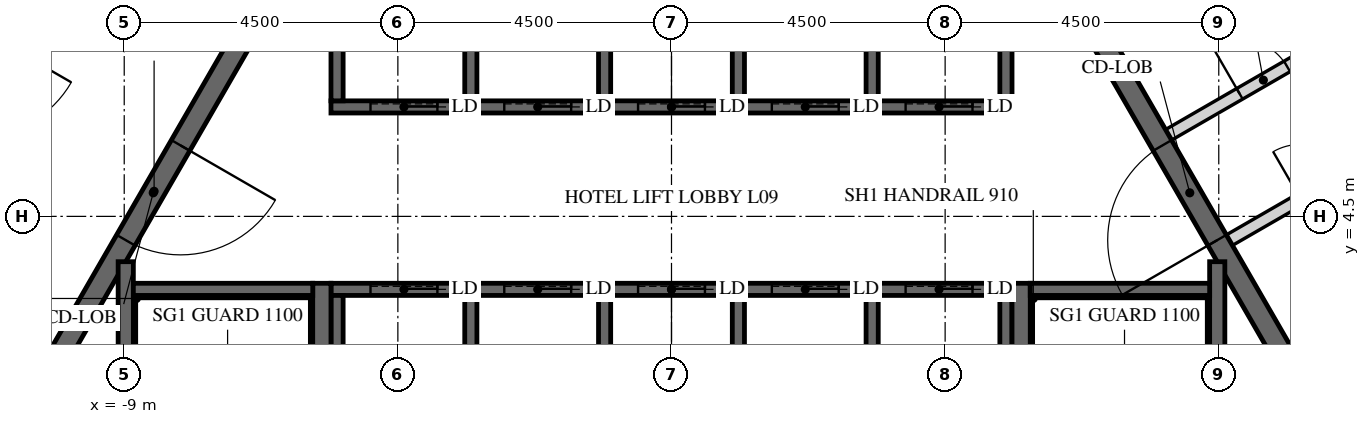
"""IFC4 building model, lengths in metres.
Left out: names, types, materials, properties, quantities, classifications, styles, units other than length and angle.
Written with IfcOpenShell. Run it as: python <this file> out.ifc"""

import sys

from ifc_helpers import new_model, si_unit, direction, frame, frame_2d, origin, place, context, subcontext, project, spatial, polyline, rectangle, outline, extrude, element, fill, save


model = new_model("IFC4")
c1 = context("Model", 3, precision=1e-05, world=origin(), true_north=direction((0.0, 1.0)))
c2 = subcontext(c1, "Body", "Model", "MODEL_VIEW")
j1 = project(units=[si_unit("LENGTHUNIT", "METRE"), si_unit("PLANEANGLEUNIT", "RADIAN")], contexts=[c1])
p1 = place(None, origin())
s1 = spatial("IfcSite", under=j1, at=p1, CompositionType="ELEMENT")
p2 = place(p1, origin())
s2 = spatial("IfcBuilding", under=s1, at=p2, CompositionType="ELEMENT")
p3 = place(p2, frame((0.0, 0.0, 49.2)))
s3 = spatial("IfcBuildingStorey", under=s2, at=p3, CompositionType="ELEMENT", Elevation=49.2)
p4 = place(p3, frame((-7.91, 13.7, -0.15), z_axis=(0.0, 0.0, 1.0), x_axis=(-0.499999880136, -0.866025472988, 0.0)))
e1 = element("IfcWall", 1, at=p4, inside=s3, PredefinedType="SHEAR", context=c2, shape_type="SweptSolid", body=[
    extrude(outline(polyline([(-0.173, -0.3), (15.993, -0.3), (15.646, 0.3), (0.173, 0.3), (-0.173, -0.3)])), origin(), (0.0, 0.0, 1.0), 3.9),
])
p5 = place(p4, frame((7.039, 0.0, 0.15)))
e2 = element("IfcOpeningElement", 2, at=p5, cuts=e1, PredefinedType="OPENING", context=c2, shape_type="SweptSolid", body=[
    extrude(rectangle(XDim=1.8, YDim=2.4, at=frame_2d((0.9, 1.2))), frame((0.0, 0.31, 0.0), z_axis=(0.0, -1.0, 0.0), x_axis=(1.0, 0.0, 0.0)), (0.0, 0.0, 1.0), 0.62),
])
p6 = place(p3, frame((15.819, 0.0, -0.15), z_axis=(0.0, 0.0, 1.0), x_axis=(-0.499999880136, 0.866025472988, 0.0)))
e3 = element("IfcWall", 3, at=p6, inside=s3, PredefinedType="SHEAR", context=c2, shape_type="SweptSolid", body=[
    extrude(outline(polyline([(-0.173, -0.3), (15.993, -0.3), (15.646, 0.3), (0.173, 0.3), (-0.173, -0.3)])), origin(), (0.0, 0.0, 1.0), 3.9),
])
p7 = place(p6, frame((6.981, 0.0, 0.15)))
e4 = element("IfcOpeningElement", 4, at=p7, cuts=e3, PredefinedType="OPENING", context=c2, shape_type="SweptSolid", body=[
    extrude(rectangle(XDim=1.8, YDim=2.4, at=frame_2d((0.9, 1.2))), frame((0.0, 0.31, 0.0), z_axis=(0.0, -1.0, 0.0), x_axis=(1.0, 0.0, 0.0)), (0.0, 0.0, 1.0), 0.62),
])
p8 = place(p3, frame((-5.673, 9.825, -0.15), z_axis=(0.0, 0.0, 1.0), x_axis=(-0.499995046907, -0.866028263435, 0.0)))
e5 = element("IfcWall", 5, at=p8, inside=s3, PredefinedType="SHEAR", context=c2, shape_type="SweptSolid", body=[
    extrude(outline(polyline([(-0.101, -0.175), (11.446, -0.175), (11.244, 0.175), (0.101, 0.175), (-0.101, -0.175)])), origin(), (0.0, 0.0, 1.0), 3.9),
])
p9 = place(p8, frame((4.801, 0.0, 0.15)))
e6 = element("IfcOpeningElement", 6, at=p9, cuts=e5, PredefinedType="OPENING", context=c2, shape_type="SweptSolid", body=[
    extrude(rectangle(XDim=1.8, YDim=2.4, at=frame_2d((0.9, 1.2))), frame((0.0, 0.185, 0.0), z_axis=(0.0, -1.0, 0.0), x_axis=(1.0, 0.0, 0.0)), (0.0, 0.0, 1.0), 0.37),
])
p10 = place(p3, frame((11.345, 0.0, -0.15), z_axis=(0.0, 0.0, 1.0), x_axis=(-0.499995046907, 0.866028263435, 0.0)))
e7 = element("IfcWall", 7, at=p10, inside=s3, PredefinedType="SHEAR", context=c2, shape_type="SweptSolid", body=[
    extrude(outline(polyline([(-0.101, -0.175), (11.446, -0.175), (11.244, 0.175), (0.101, 0.175), (-0.101, -0.175)])), origin(), (0.0, 0.0, 1.0), 3.9),
])
p11 = place(p10, frame((4.744, 0.0, 0.15)))
e8 = element("IfcOpeningElement", 8, at=p11, cuts=e7, PredefinedType="OPENING", context=c2, shape_type="SweptSolid", body=[
    extrude(rectangle(XDim=1.8, YDim=2.4, at=frame_2d((0.9, 1.2))), frame((0.0, 0.185, 0.0), z_axis=(0.0, -1.0, 0.0), x_axis=(1.0, 0.0, 0.0)), (0.0, 0.0, 1.0), 0.37),
])
p12 = place(p3, frame((-5.6, 6.3, -0.25), z_axis=(0.0, 0.0, 1.0), x_axis=(1.0, 0.0, 0.0)))
e9 = element("IfcWall", 9, at=p12, inside=s3, PredefinedType="SHEAR", context=c2, shape_type="SweptSolid", body=[
    extrude(rectangle(XDim=11.2, YDim=0.2, at=frame_2d((5.6, 0.0))), origin(), (0.0, 0.0, 1.0), 3.9),
])
p13 = place(p12, frame((0.65, 0.0, 0.25)))
e10 = element("IfcOpeningElement", 10, at=p13, cuts=e9, PredefinedType="OPENING", context=c2, shape_type="SweptSolid", body=[
    extrude(rectangle(XDim=1.1, YDim=2.1, at=frame_2d((0.55, 1.05))), frame((0.0, 0.11, 0.0), z_axis=(0.0, -1.0, 0.0), x_axis=(1.0, 0.0, 0.0)), (0.0, 0.0, 1.0), 0.22),
])
p14 = place(p12, frame((2.85, 0.0, 0.25)))
e11 = element("IfcOpeningElement", 11, at=p14, cuts=e9, PredefinedType="OPENING", context=c2, shape_type="SweptSolid", body=[
    extrude(rectangle(XDim=1.1, YDim=2.1, at=frame_2d((0.55, 1.05))), frame((0.0, 0.11, 0.0), z_axis=(0.0, -1.0, 0.0), x_axis=(1.0, 0.0, 0.0)), (0.0, 0.0, 1.0), 0.22),
])
p15 = place(p12, frame((5.05, 0.0, 0.25)))
e12 = element("IfcOpeningElement", 12, at=p15, cuts=e9, PredefinedType="OPENING", context=c2, shape_type="SweptSolid", body=[
    extrude(rectangle(XDim=1.1, YDim=2.1, at=frame_2d((0.55, 1.05))), frame((0.0, 0.11, 0.0), z_axis=(0.0, -1.0, 0.0), x_axis=(1.0, 0.0, 0.0)), (0.0, 0.0, 1.0), 0.22),
])
p16 = place(p12, frame((7.25, 0.0, 0.25)))
e13 = element("IfcOpeningElement", 13, at=p16, cuts=e9, PredefinedType="OPENING", context=c2, shape_type="SweptSolid", body=[
    extrude(rectangle(XDim=1.1, YDim=2.1, at=frame_2d((0.55, 1.05))), frame((0.0, 0.11, 0.0), z_axis=(0.0, -1.0, 0.0), x_axis=(1.0, 0.0, 0.0)), (0.0, 0.0, 1.0), 0.22),
])
p17 = place(p12, frame((9.45, 0.0, 0.25)))
e14 = element("IfcOpeningElement", 14, at=p17, cuts=e9, PredefinedType="OPENING", context=c2, shape_type="SweptSolid", body=[
    extrude(rectangle(XDim=1.1, YDim=2.1, at=frame_2d((0.55, 1.05))), frame((0.0, 0.11, 0.0), z_axis=(0.0, -1.0, 0.0), x_axis=(1.0, 0.0, 0.0)), (0.0, 0.0, 1.0), 0.22),
])
for number, where, z_axis, x_axis in (
    (15, (-5.5, 6.4, -0.25), (0.0, 0.0, 1.0), (0.0, 1.0, 0.0)),
    (16, (-3.3, 6.4, -0.25), (0.0, 0.0, 1.0), (0.0, 1.0, 0.0)),
    (17, (-1.1, 6.4, -0.25), (0.0, 0.0, 1.0), (0.0, 1.0, 0.0)),
    (18, (1.1, 6.4, -0.25), (0.0, 0.0, 1.0), (0.0, 1.0, 0.0)),
    (19, (3.3, 6.4, -0.25), (0.0, 0.0, 1.0), (0.0, 1.0, 0.0)),
    (20, (5.5, 6.4, -0.25), (0.0, 0.0, 1.0), (0.0, 1.0, 0.0)),
):
    element("IfcWall", number, at=place(p3, frame(where, z_axis=z_axis, x_axis=x_axis)), inside=s3, PredefinedType="SHEAR", context=c2, shape_type="SweptSolid", body=[
        extrude(rectangle(XDim=2.9, YDim=0.2, at=frame_2d((1.45, 0.0))), origin(), (0.0, 0.0, 1.0), 3.9),
    ])
p18 = place(p3, frame((-5.6, 3.3, -0.25), z_axis=(0.0, 0.0, 1.0), x_axis=(1.0, 0.0, 0.0)))
e21 = element("IfcWall", 21, at=p18, inside=s3, PredefinedType="SHEAR", context=c2, shape_type="SweptSolid", body=[
    extrude(rectangle(XDim=11.2, YDim=0.2, at=frame_2d((5.6, 0.0))), origin(), (0.0, 0.0, 1.0), 3.9),
])
p19 = place(p18, frame((0.65, 0.0, 0.25)))
e22 = element("IfcOpeningElement", 22, at=p19, cuts=e21, PredefinedType="OPENING", context=c2, shape_type="SweptSolid", body=[
    extrude(rectangle(XDim=1.1, YDim=2.1, at=frame_2d((0.55, 1.05))), frame((0.0, 0.11, 0.0), z_axis=(0.0, -1.0, 0.0), x_axis=(1.0, 0.0, 0.0)), (0.0, 0.0, 1.0), 0.22),
])
p20 = place(p18, frame((2.85, 0.0, 0.25)))
e23 = element("IfcOpeningElement", 23, at=p20, cuts=e21, PredefinedType="OPENING", context=c2, shape_type="SweptSolid", body=[
    extrude(rectangle(XDim=1.1, YDim=2.1, at=frame_2d((0.55, 1.05))), frame((0.0, 0.11, 0.0), z_axis=(0.0, -1.0, 0.0), x_axis=(1.0, 0.0, 0.0)), (0.0, 0.0, 1.0), 0.22),
])
p21 = place(p18, frame((5.05, 0.0, 0.25)))
e24 = element("IfcOpeningElement", 24, at=p21, cuts=e21, PredefinedType="OPENING", context=c2, shape_type="SweptSolid", body=[
    extrude(rectangle(XDim=1.1, YDim=2.1, at=frame_2d((0.55, 1.05))), frame((0.0, 0.11, 0.0), z_axis=(0.0, -1.0, 0.0), x_axis=(1.0, 0.0, 0.0)), (0.0, 0.0, 1.0), 0.22),
])
p22 = place(p18, frame((7.25, 0.0, 0.25)))
e25 = element("IfcOpeningElement", 25, at=p22, cuts=e21, PredefinedType="OPENING", context=c2, shape_type="SweptSolid", body=[
    extrude(rectangle(XDim=1.1, YDim=2.1, at=frame_2d((0.55, 1.05))), frame((0.0, 0.11, 0.0), z_axis=(0.0, -1.0, 0.0), x_axis=(1.0, 0.0, 0.0)), (0.0, 0.0, 1.0), 0.22),
])
p23 = place(p18, frame((9.45, 0.0, 0.25)))
e26 = element("IfcOpeningElement", 26, at=p23, cuts=e21, PredefinedType="OPENING", context=c2, shape_type="SweptSolid", body=[
    extrude(rectangle(XDim=1.1, YDim=2.1, at=frame_2d((0.55, 1.05))), frame((0.0, 0.11, 0.0), z_axis=(0.0, -1.0, 0.0), x_axis=(1.0, 0.0, 0.0)), (0.0, 0.0, 1.0), 0.22),
])
for number, where, z_axis, x_axis in (
    (27, (-5.5, 0.1, -0.25), (0.0, 0.0, 1.0), (0.0, 1.0, 0.0)),
    (28, (-3.3, 0.1, -0.25), (0.0, 0.0, 1.0), (0.0, 1.0, 0.0)),
    (29, (-1.1, 0.1, -0.25), (0.0, 0.0, 1.0), (0.0, 1.0, 0.0)),
    (30, (1.1, 0.1, -0.25), (0.0, 0.0, 1.0), (0.0, 1.0, 0.0)),
    (31, (3.3, 0.1, -0.25), (0.0, 0.0, 1.0), (0.0, 1.0, 0.0)),
    (32, (5.5, 0.1, -0.25), (0.0, 0.0, 1.0), (0.0, 1.0, 0.0)),
):
    element("IfcWall", number, at=place(p3, frame(where, z_axis=z_axis, x_axis=x_axis)), inside=s3, PredefinedType="SHEAR", context=c2, shape_type="SweptSolid", body=[
        extrude(rectangle(XDim=3.1, YDim=0.2, at=frame_2d((1.55, 0.0))), origin(), (0.0, 0.0, 1.0), 3.9),
    ])
p24 = place(p3, frame((8.175, 5.841, 0.0), z_axis=(0.0, 0.0, 1.0), x_axis=(0.866020560687, 0.500008388397, 0.0)))
e33 = element("IfcWall", 33, at=p24, inside=s3, PredefinedType="PARTITIONING", context=c2, shape_type="SweptSolid", body=[
    extrude(rectangle(XDim=3.4, YDim=0.2, at=frame_2d((1.7, 0.0))), origin(), (0.0, 0.0, 1.0), 3.65),
])
p25 = place(p24, frame((1.35, 0.0, 0.0)))
e34 = element("IfcOpeningElement", 34, at=p25, cuts=e33, PredefinedType="OPENING", context=c2, shape_type="SweptSolid", body=[
    extrude(rectangle(XDim=0.9, YDim=2.1, at=frame_2d((0.45, 1.05))), frame((0.0, 0.11, 0.0), z_axis=(0.0, -1.0, 0.0), x_axis=(1.0, 0.0, 0.0)), (0.0, 0.0, 1.0), 0.22),
])
p26 = place(p3, frame((9.175, 4.109, 0.0), z_axis=(0.0, 0.0, 1.0), x_axis=(0.865989465428, 0.500062241894, 0.0)))
e35 = element("IfcWall", 35, at=p26, inside=s3, PredefinedType="PARTITIONING", context=c2, shape_type="SweptSolid", body=[
    extrude(rectangle(XDim=3.4, YDim=0.2, at=frame_2d((1.7, 0.0))), origin(), (0.0, 0.0, 1.0), 3.65),
])
p27 = place(p26, frame((1.351, 0.0, 0.0)))
e36 = element("IfcOpeningElement", 36, at=p27, cuts=e35, PredefinedType="OPENING", context=c2, shape_type="SweptSolid", body=[
    extrude(rectangle(XDim=0.9, YDim=2.1, at=frame_2d((0.45, 1.05))), frame((0.0, 0.11, 0.0), z_axis=(0.0, -1.0, 0.0), x_axis=(1.0, 0.0, 0.0)), (0.0, 0.0, 1.0), 0.22),
])
p28 = place(p3, frame((5.75, -3.4, -0.25), z_axis=(0.0, 0.0, 1.0), x_axis=(0.0, 1.0, 0.0)))
e37 = element("IfcWall", 37, at=p28, inside=s3, PredefinedType="SHEAR", context=c2, shape_type="SweptSolid", body=[
    extrude(rectangle(XDim=6.8, YDim=0.3, at=frame_2d((3.4, 0.0))), origin(), (0.0, 0.0, 1.0), 3.9),
])
p29 = place(p3, frame((8.975, -3.755, -0.25), z_axis=(0.0, 0.0, 1.0), x_axis=(0.0, 1.0, 0.0)))
e38 = element("IfcWall", 38, at=p29, inside=s3, PredefinedType="SHEAR", context=c2, shape_type="SweptSolid", body=[
    extrude(rectangle(XDim=7.51, YDim=0.25, at=frame_2d((3.755, 0.0))), origin(), (0.0, 0.0, 1.0), 3.9),
])
p30 = place(p3, frame((5.9, 3.3, -0.25), z_axis=(0.0, 0.0, 1.0), x_axis=(1.0, 0.0, 0.0)))
e39 = element("IfcWall", 39, at=p30, inside=s3, PredefinedType="SHEAR", context=c2, shape_type="SweptSolid", body=[
    extrude(rectangle(XDim=2.95, YDim=0.2, at=frame_2d((1.475, 0.0))), origin(), (0.0, 0.0, 1.0), 3.9),
])
p31 = place(p3, frame((-5.75, -3.4, -0.25), z_axis=(0.0, 0.0, 1.0), x_axis=(0.0, 1.0, 0.0)))
e40 = element("IfcWall", 40, at=p31, inside=s3, PredefinedType="SHEAR", context=c2, shape_type="SweptSolid", body=[
    extrude(rectangle(XDim=6.8, YDim=0.3, at=frame_2d((3.4, 0.0))), origin(), (0.0, 0.0, 1.0), 3.9),
])
p32 = place(p3, frame((-8.975, -3.755, -0.25), z_axis=(0.0, 0.0, 1.0), x_axis=(0.0, 1.0, 0.0)))
e41 = element("IfcWall", 41, at=p32, inside=s3, PredefinedType="SHEAR", context=c2, shape_type="SweptSolid", body=[
    extrude(rectangle(XDim=7.51, YDim=0.25, at=frame_2d((3.755, 0.0))), origin(), (0.0, 0.0, 1.0), 3.9),
])
p33 = place(p3, frame((-8.85, 3.3, -0.25), z_axis=(0.0, 0.0, 1.0), x_axis=(1.0, 0.0, 0.0)))
e42 = element("IfcWall", 42, at=p33, inside=s3, PredefinedType="SHEAR", context=c2, shape_type="SweptSolid", body=[
    extrude(rectangle(XDim=2.95, YDim=0.2, at=frame_2d((1.475, 0.0))), origin(), (0.0, 0.0, 1.0), 3.9),
])
p34 = place(p9, origin())
e43 = element("IfcDoor", 43, at=p34, inside=s3, OperationType="DOUBLE_DOOR_SINGLE_SWING", PredefinedType="DOOR", context=c2, shape_type="SweptSolid", body=[
    extrude(rectangle(XDim=1.8, YDim=2.4, at=frame_2d((0.9, 1.2))), frame((0.0, 0.025, 0.0), z_axis=(0.0, -1.0, 0.0), x_axis=(1.0, 0.0, 0.0)), (0.0, 0.0, 1.0), 0.05),
])
fill(e6, e43)
p35 = place(p11, origin())
e44 = element("IfcDoor", 44, at=p35, inside=s3, OperationType="DOUBLE_DOOR_SINGLE_SWING", PredefinedType="DOOR", context=c2, shape_type="SweptSolid", body=[
    extrude(rectangle(XDim=1.8, YDim=2.4, at=frame_2d((0.9, 1.2))), frame((0.0, 0.025, 0.0), z_axis=(0.0, -1.0, 0.0), x_axis=(1.0, 0.0, 0.0)), (0.0, 0.0, 1.0), 0.05),
])
fill(e8, e44)
p36 = place(p25, origin())
e45 = element("IfcDoor", 45, at=p36, inside=s3, OperationType="SINGLE_SWING_LEFT", PredefinedType="DOOR", context=c2, shape_type="SweptSolid", body=[
    extrude(rectangle(XDim=0.9, YDim=2.1, at=frame_2d((0.45, 1.05))), frame((0.0, 0.025, 0.0), z_axis=(0.0, -1.0, 0.0), x_axis=(1.0, 0.0, 0.0)), (0.0, 0.0, 1.0), 0.05),
])
fill(e34, e45)
p37 = place(p13, origin())
e46 = element("IfcDoor", 46, at=p37, inside=s3, OperationType="SLIDING_TO_LEFT", PredefinedType="DOOR", context=c2, shape_type="SweptSolid", body=[
    extrude(rectangle(XDim=1.1, YDim=2.1, at=frame_2d((0.55, 1.05))), frame((0.0, 0.025, 0.0), z_axis=(0.0, -1.0, 0.0), x_axis=(1.0, 0.0, 0.0)), (0.0, 0.0, 1.0), 0.05),
])
fill(e10, e46)
p38 = place(p14, origin())
e47 = element("IfcDoor", 47, at=p38, inside=s3, OperationType="SLIDING_TO_LEFT", PredefinedType="DOOR", context=c2, shape_type="SweptSolid", body=[
    extrude(rectangle(XDim=1.1, YDim=2.1, at=frame_2d((0.55, 1.05))), frame((0.0, 0.025, 0.0), z_axis=(0.0, -1.0, 0.0), x_axis=(1.0, 0.0, 0.0)), (0.0, 0.0, 1.0), 0.05),
])
fill(e11, e47)
p39 = place(p15, origin())
e48 = element("IfcDoor", 48, at=p39, inside=s3, OperationType="SLIDING_TO_LEFT", PredefinedType="DOOR", context=c2, shape_type="SweptSolid", body=[
    extrude(rectangle(XDim=1.1, YDim=2.1, at=frame_2d((0.55, 1.05))), frame((0.0, 0.025, 0.0), z_axis=(0.0, -1.0, 0.0), x_axis=(1.0, 0.0, 0.0)), (0.0, 0.0, 1.0), 0.05),
])
fill(e12, e48)
p40 = place(p16, origin())
e49 = element("IfcDoor", 49, at=p40, inside=s3, OperationType="SLIDING_TO_LEFT", PredefinedType="DOOR", context=c2, shape_type="SweptSolid", body=[
    extrude(rectangle(XDim=1.1, YDim=2.1, at=frame_2d((0.55, 1.05))), frame((0.0, 0.025, 0.0), z_axis=(0.0, -1.0, 0.0), x_axis=(1.0, 0.0, 0.0)), (0.0, 0.0, 1.0), 0.05),
])
fill(e13, e49)
p41 = place(p17, origin())
e50 = element("IfcDoor", 50, at=p41, inside=s3, OperationType="SLIDING_TO_LEFT", PredefinedType="DOOR", context=c2, shape_type="SweptSolid", body=[
    extrude(rectangle(XDim=1.1, YDim=2.1, at=frame_2d((0.55, 1.05))), frame((0.0, 0.025, 0.0), z_axis=(0.0, -1.0, 0.0), x_axis=(1.0, 0.0, 0.0)), (0.0, 0.0, 1.0), 0.05),
])
fill(e14, e50)
p42 = place(p19, origin())
e51 = element("IfcDoor", 51, at=p42, inside=s3, OperationType="SLIDING_TO_LEFT", PredefinedType="DOOR", context=c2, shape_type="SweptSolid", body=[
    extrude(rectangle(XDim=1.1, YDim=2.1, at=frame_2d((0.55, 1.05))), frame((0.0, 0.025, 0.0), z_axis=(0.0, -1.0, 0.0), x_axis=(1.0, 0.0, 0.0)), (0.0, 0.0, 1.0), 0.05),
])
fill(e22, e51)
p43 = place(p20, origin())
e52 = element("IfcDoor", 52, at=p43, inside=s3, OperationType="SLIDING_TO_LEFT", PredefinedType="DOOR", context=c2, shape_type="SweptSolid", body=[
    extrude(rectangle(XDim=1.1, YDim=2.1, at=frame_2d((0.55, 1.05))), frame((0.0, 0.025, 0.0), z_axis=(0.0, -1.0, 0.0), x_axis=(1.0, 0.0, 0.0)), (0.0, 0.0, 1.0), 0.05),
])
fill(e23, e52)
p44 = place(p21, origin())
e53 = element("IfcDoor", 53, at=p44, inside=s3, OperationType="SLIDING_TO_LEFT", PredefinedType="DOOR", context=c2, shape_type="SweptSolid", body=[
    extrude(rectangle(XDim=1.1, YDim=2.1, at=frame_2d((0.55, 1.05))), frame((0.0, 0.025, 0.0), z_axis=(0.0, -1.0, 0.0), x_axis=(1.0, 0.0, 0.0)), (0.0, 0.0, 1.0), 0.05),
])
fill(e24, e53)
p45 = place(p22, origin())
e54 = element("IfcDoor", 54, at=p45, inside=s3, OperationType="SLIDING_TO_LEFT", PredefinedType="DOOR", context=c2, shape_type="SweptSolid", body=[
    extrude(rectangle(XDim=1.1, YDim=2.1, at=frame_2d((0.55, 1.05))), frame((0.0, 0.025, 0.0), z_axis=(0.0, -1.0, 0.0), x_axis=(1.0, 0.0, 0.0)), (0.0, 0.0, 1.0), 0.05),
])
fill(e25, e54)
p46 = place(p23, origin())
e55 = element("IfcDoor", 55, at=p46, inside=s3, OperationType="SLIDING_TO_LEFT", PredefinedType="DOOR", context=c2, shape_type="SweptSolid", body=[
    extrude(rectangle(XDim=1.1, YDim=2.1, at=frame_2d((0.55, 1.05))), frame((0.0, 0.025, 0.0), z_axis=(0.0, -1.0, 0.0), x_axis=(1.0, 0.0, 0.0)), (0.0, 0.0, 1.0), 0.05),
])
fill(e26, e55)
save(model, sys.argv[1])
